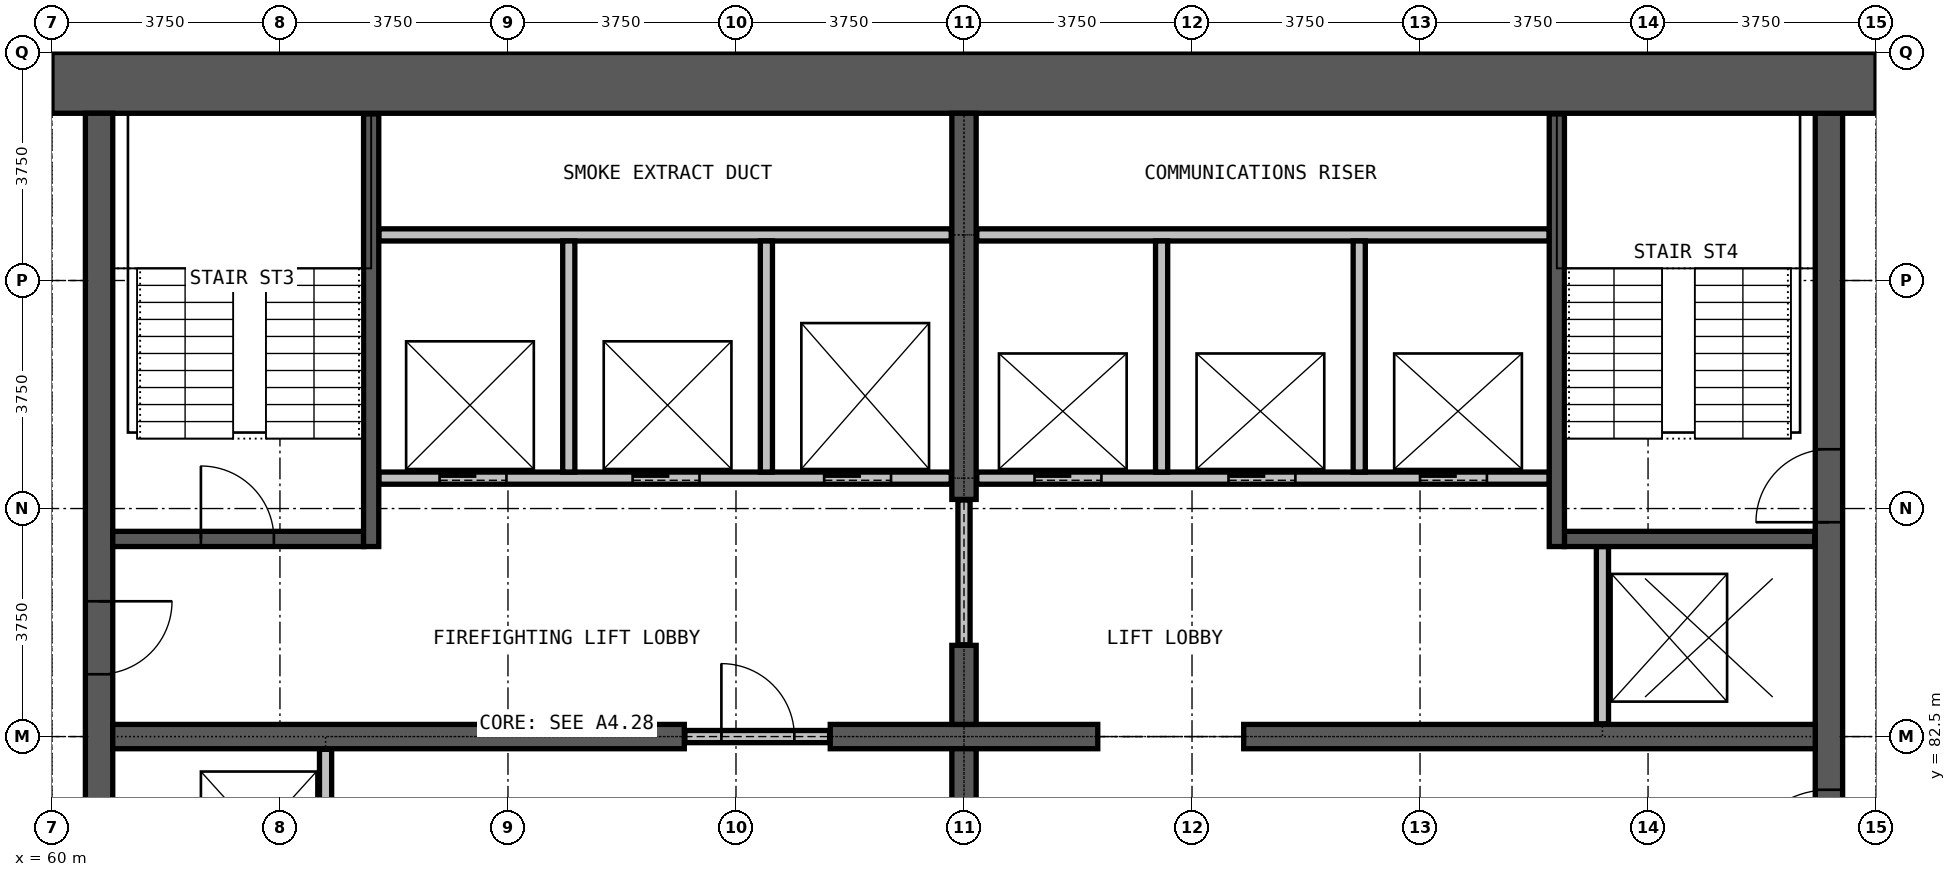
"""IFC4 building model, lengths in metres.
Left out: names, types, materials, properties, quantities, classifications, styles, units other than length and angle.
Written with IfcOpenShell. Run it as: python <this file> out.ifc"""

import sys

from ifc_helpers import new_model, si_unit, direction, frame, frame_2d, origin, place, context, subcontext, project, spatial, rectangle, extrude, element, fill, save


model = new_model("IFC4")
c1 = context("Model", 3, precision=1e-05, world=origin(), true_north=direction((0.0, 1.0)))
c2 = subcontext(c1, "Body", "Model", "MODEL_VIEW")
j1 = project(units=[si_unit("LENGTHUNIT", "METRE"), si_unit("PLANEANGLEUNIT", "RADIAN")], contexts=[c1])
p1 = place(None, origin())
s1 = spatial("IfcSite", under=j1, at=p1, CompositionType="ELEMENT")
p2 = place(p1, origin())
s2 = spatial("IfcBuilding", under=s1, at=p2, CompositionType="ELEMENT")
p3 = place(p2, frame((0.0, 0.0, 269.3)))
s3 = spatial("IfcBuildingStorey", under=s2, at=p3, CompositionType="ELEMENT", Elevation=269.3)
p4 = place(p3, frame((89.225, 72.25, 0.0), z_axis=(0.0, 0.0, 1.0), x_axis=(0.0, 1.0, 0.0)))
e1 = element("IfcWall", 1, at=p4, inside=s3, PredefinedType="SHEAR", context=c2, shape_type="SweptSolid", body=[
    extrude(rectangle(XDim=20.5, YDim=0.45, at=frame_2d((10.25, 0.0))), origin(), (0.0, 0.0, 1.0), 3.6),
])
p5 = place(p4, frame((0.275, 0.0, 0.0)))
e2 = element("IfcOpeningElement", 2, at=p5, cuts=e1, PredefinedType="OPENING", context=c2, shape_type="SweptSolid", body=[
    extrude(rectangle(XDim=1.2, YDim=2.2, at=frame_2d((0.6, 1.1))), frame((0.0, 0.235, 0.0), z_axis=(0.0, -1.0, 0.0), x_axis=(1.0, 0.0, 0.0)), (0.0, 0.0, 1.0), 0.47),
])
p6 = place(p4, frame((13.775, 0.0, 0.0)))
e3 = element("IfcOpeningElement", 3, at=p6, cuts=e1, PredefinedType="OPENING", context=c2, shape_type="SweptSolid", body=[
    extrude(rectangle(XDim=1.2, YDim=2.2, at=frame_2d((0.6, 1.1))), frame((0.0, 0.235, 0.0), z_axis=(0.0, -1.0, 0.0), x_axis=(1.0, 0.0, 0.0)), (0.0, 0.0, 1.0), 0.47),
])
p7 = place(p4, frame((7.875, 0.0, 0.0)))
e4 = element("IfcOpeningElement", 4, at=p7, cuts=e1, PredefinedType="OPENING", context=c2, shape_type="SweptSolid", body=[
    extrude(rectangle(XDim=1.5, YDim=2.2, at=frame_2d((0.75, 1.1))), frame((0.0, 0.235, 0.0), z_axis=(0.0, -1.0, 0.0), x_axis=(1.0, 0.0, 0.0)), (0.0, 0.0, 1.0), 0.47),
])
p8 = place(p3, frame((90.0, 93.25, 0.0), z_axis=(0.0, 0.0, 1.0), x_axis=(-1.0, 0.0, 0.0)))
e5 = element("IfcWall", 5, at=p8, inside=s3, PredefinedType="SHEAR", context=c2, shape_type="SweptSolid", body=[
    extrude(rectangle(XDim=30.0, YDim=1.0, at=frame_2d((15.0, 0.0))), origin(), (0.0, 0.0, 1.0), 3.6),
])
p9 = place(p3, frame((60.775, 92.75, 0.0), z_axis=(0.0, 0.0, 1.0), x_axis=(0.0, -1.0, 0.0)))
e6 = element("IfcWall", 6, at=p9, inside=s3, PredefinedType="SHEAR", context=c2, shape_type="SweptSolid", body=[
    extrude(rectangle(XDim=20.5, YDim=0.45, at=frame_2d((10.25, 0.0))), origin(), (0.0, 0.0, 1.0), 3.6),
])
p10 = place(p9, frame((19.025, 0.0, 0.0)))
e7 = element("IfcOpeningElement", 7, at=p10, cuts=e6, PredefinedType="OPENING", context=c2, shape_type="SweptSolid", body=[
    extrude(rectangle(XDim=1.2, YDim=2.2, at=frame_2d((0.6, 1.1))), frame((0.0, 0.235, 0.0), z_axis=(0.0, -1.0, 0.0), x_axis=(1.0, 0.0, 0.0)), (0.0, 0.0, 1.0), 0.47),
])
p11 = place(p9, frame((8.025, 0.0, 0.0)))
e8 = element("IfcOpeningElement", 8, at=p11, cuts=e6, PredefinedType="OPENING", context=c2, shape_type="SweptSolid", body=[
    extrude(rectangle(XDim=1.2, YDim=2.2, at=frame_2d((0.6, 1.1))), frame((0.0, 0.235, 0.0), z_axis=(0.0, -1.0, 0.0), x_axis=(1.0, 0.0, 0.0)), (0.0, 0.0, 1.0), 0.47),
])
p12 = place(p3, frame((61.0, 82.5, 0.0), z_axis=(0.0, 0.0, 1.0), x_axis=(1.0, 0.0, 0.0)))
e9 = element("IfcWall", 9, at=p12, inside=s3, PredefinedType="SHEAR", context=c2, shape_type="SweptSolid", body=[
    extrude(rectangle(XDim=9.4, YDim=0.4, at=frame_2d((4.7, 0.0))), origin(), (0.0, 0.0, 1.0), 3.6),
])
p13 = place(p3, frame((72.8, 82.5, 0.0), z_axis=(0.0, 0.0, 1.0), x_axis=(1.0, 0.0, 0.0)))
e10 = element("IfcWall", 10, at=p13, inside=s3, PredefinedType="SHEAR", context=c2, shape_type="SweptSolid", body=[
    extrude(rectangle(XDim=4.4, YDim=0.4, at=frame_2d((2.2, 0.0))), origin(), (0.0, 0.0, 1.0), 3.6),
])
p14 = place(p3, frame((79.6, 82.5, 0.0), z_axis=(0.0, 0.0, 1.0), x_axis=(1.0, 0.0, 0.0)))
e11 = element("IfcWall", 11, at=p14, inside=s3, PredefinedType="SHEAR", context=c2, shape_type="SweptSolid", body=[
    extrude(rectangle(XDim=9.4, YDim=0.4, at=frame_2d((4.7, 0.0))), origin(), (0.0, 0.0, 1.0), 3.6),
])
for number, where, z_axis, x_axis in (
    (12, (75.0, 81.0, 0.0), (0.0, 0.0, 1.0), (0.0, 1.0, 0.0)),
    (13, (75.0, 82.7, 0.0), (0.0, 0.0, 1.0), (0.0, 1.0, 0.0)),
):
    element("IfcWall", number, at=place(p3, frame(where, z_axis=z_axis, x_axis=x_axis)), inside=s3, PredefinedType="SHEAR", context=c2, shape_type="SweptSolid", body=[
        extrude(rectangle(XDim=1.3, YDim=0.4, at=frame_2d((0.65, 0.0))), origin(), (0.0, 0.0, 1.0), 3.6),
    ])
p15 = place(p3, frame((75.0, 86.4, 0.0), z_axis=(0.0, 0.0, 1.0), x_axis=(0.0, 1.0, 0.0)))
e14 = element("IfcWall", 14, at=p15, inside=s3, PredefinedType="SHEAR", context=c2, shape_type="SweptSolid", body=[
    extrude(rectangle(XDim=6.35, YDim=0.4, at=frame_2d((3.175, 0.0))), origin(), (0.0, 0.0, 1.0), 3.6),
])
p16 = place(p3, frame((70.41, 82.5, 0.0), z_axis=(0.0, 0.0, 1.0), x_axis=(1.0, 0.0, 0.0)))
e15 = element("IfcWall", 15, at=p16, inside=s3, PredefinedType="PARTITIONING", context=c2, shape_type="SweptSolid", body=[
    extrude(rectangle(XDim=2.38, YDim=0.2, at=frame_2d((1.19, 0.0))), origin(), (0.0, 0.0, 1.0), 2.4),
])
p17 = place(p16, frame((0.6, 0.0, 0.0)))
e16 = element("IfcOpeningElement", 16, at=p17, cuts=e15, PredefinedType="OPENING", context=c2, shape_type="SweptSolid", body=[
    extrude(rectangle(XDim=1.2, YDim=2.2, at=frame_2d((0.6, 1.1))), frame((0.0, 0.11, 0.0), z_axis=(0.0, -1.0, 0.0), x_axis=(1.0, 0.0, 0.0)), (0.0, 0.0, 1.0), 0.22),
])
p18 = place(p3, frame((75.0, 84.01, 0.0), z_axis=(0.0, 0.0, 1.0), x_axis=(0.0, 1.0, 0.0)))
e17 = element("IfcWall", 17, at=p18, inside=s3, PredefinedType="PARTITIONING", context=c2, shape_type="SweptSolid", body=[
    extrude(rectangle(XDim=2.38, YDim=0.2, at=frame_2d((1.19, 0.0))), origin(), (0.0, 0.0, 1.0), 2.4),
])
p19 = place(p3, frame((65.375, 86.75, 0.0), z_axis=(0.0, 0.0, 1.0), x_axis=(1.0, 0.0, 0.0)))
e18 = element("IfcWall", 18, at=p19, inside=s3, PredefinedType="PARTITIONING", context=c2, shape_type="SweptSolid", body=[
    extrude(rectangle(XDim=9.415, YDim=0.2, at=frame_2d((4.708, 0.0))), origin(), (0.0, 0.0, 1.0), 3.3),
])
p20 = place(p19, frame((1.0, 0.0, 0.0)))
e19 = element("IfcOpeningElement", 19, at=p20, cuts=e18, PredefinedType="OPENING", context=c2, shape_type="SweptSolid", body=[
    extrude(rectangle(XDim=1.1, YDim=2.2, at=frame_2d((0.55, 1.1))), frame((0.0, 0.11, 0.0), z_axis=(0.0, -1.0, 0.0), x_axis=(1.0, 0.0, 0.0)), (0.0, 0.0, 1.0), 0.22),
])
p21 = place(p19, frame((4.175, 0.0, 0.0)))
e20 = element("IfcOpeningElement", 20, at=p21, cuts=e18, PredefinedType="OPENING", context=c2, shape_type="SweptSolid", body=[
    extrude(rectangle(XDim=1.1, YDim=2.2, at=frame_2d((0.55, 1.1))), frame((0.0, 0.11, 0.0), z_axis=(0.0, -1.0, 0.0), x_axis=(1.0, 0.0, 0.0)), (0.0, 0.0, 1.0), 0.22),
])
p22 = place(p19, frame((7.325, 0.0, 0.0)))
e21 = element("IfcOpeningElement", 21, at=p22, cuts=e18, PredefinedType="OPENING", context=c2, shape_type="SweptSolid", body=[
    extrude(rectangle(XDim=1.1, YDim=2.2, at=frame_2d((0.55, 1.1))), frame((0.0, 0.11, 0.0), z_axis=(0.0, -1.0, 0.0), x_axis=(1.0, 0.0, 0.0)), (0.0, 0.0, 1.0), 0.22),
])
p23 = place(p3, frame((75.21, 86.75, 0.0), z_axis=(0.0, 0.0, 1.0), x_axis=(1.0, 0.0, 0.0)))
e22 = element("IfcWall", 22, at=p23, inside=s3, PredefinedType="PARTITIONING", context=c2, shape_type="SweptSolid", body=[
    extrude(rectangle(XDim=9.415, YDim=0.2, at=frame_2d((4.708, 0.0))), origin(), (0.0, 0.0, 1.0), 3.3),
])
p24 = place(p23, frame((0.95, 0.0, 0.0)))
e23 = element("IfcOpeningElement", 23, at=p24, cuts=e22, PredefinedType="OPENING", context=c2, shape_type="SweptSolid", body=[
    extrude(rectangle(XDim=1.1, YDim=2.2, at=frame_2d((0.55, 1.1))), frame((0.0, 0.11, 0.0), z_axis=(0.0, -1.0, 0.0), x_axis=(1.0, 0.0, 0.0)), (0.0, 0.0, 1.0), 0.22),
])
p25 = place(p23, frame((4.14, 0.0, 0.0)))
e24 = element("IfcOpeningElement", 24, at=p25, cuts=e22, PredefinedType="OPENING", context=c2, shape_type="SweptSolid", body=[
    extrude(rectangle(XDim=1.1, YDim=2.2, at=frame_2d((0.55, 1.1))), frame((0.0, 0.11, 0.0), z_axis=(0.0, -1.0, 0.0), x_axis=(1.0, 0.0, 0.0)), (0.0, 0.0, 1.0), 0.22),
])
p26 = place(p23, frame((7.29, 0.0, 0.0)))
e25 = element("IfcOpeningElement", 25, at=p26, cuts=e22, PredefinedType="OPENING", context=c2, shape_type="SweptSolid", body=[
    extrude(rectangle(XDim=1.1, YDim=2.2, at=frame_2d((0.55, 1.1))), frame((0.0, 0.11, 0.0), z_axis=(0.0, -1.0, 0.0), x_axis=(1.0, 0.0, 0.0)), (0.0, 0.0, 1.0), 0.22),
])
for number, where, z_axis, x_axis in (
    (26, (65.375, 90.75, 0.0), (0.0, 0.0, 1.0), (1.0, 0.0, 0.0)),
    (27, (75.21, 90.75, 0.0), (0.0, 0.0, 1.0), (1.0, 0.0, 0.0)),
):
    element("IfcWall", number, at=place(p3, frame(where, z_axis=z_axis, x_axis=x_axis)), inside=s3, PredefinedType="PARTITIONING", context=c2, shape_type="SweptSolid", body=[
        extrude(rectangle(XDim=9.415, YDim=0.2, at=frame_2d((4.708, 0.0))), origin(), (0.0, 0.0, 1.0), 3.3),
    ])
p27 = place(p3, frame((64.5, 79.375, 0.0), z_axis=(0.0, 0.0, 1.0), x_axis=(0.0, 1.0, 0.0)))
e28 = element("IfcWall", 28, at=p27, inside=s3, PredefinedType="PARTITIONING", context=c2, shape_type="SweptSolid", body=[
    extrude(rectangle(XDim=2.915, YDim=0.2, at=frame_2d((1.458, 0.0))), origin(), (0.0, 0.0, 1.0), 3.3),
])
for number, where, z_axis, x_axis in (
    (29, (68.5, 86.85, 0.0), (0.0, 0.0, 1.0), (0.0, 1.0, 0.0)),
    (30, (71.75, 86.85, 0.0), (0.0, 0.0, 1.0), (0.0, 1.0, 0.0)),
    (31, (78.25, 86.85, 0.0), (0.0, 0.0, 1.0), (0.0, 1.0, 0.0)),
    (32, (81.5, 86.85, 0.0), (0.0, 0.0, 1.0), (0.0, 1.0, 0.0)),
):
    element("IfcWall", number, at=place(p3, frame(where, z_axis=z_axis, x_axis=x_axis)), inside=s3, PredefinedType="PARTITIONING", context=c2, shape_type="SweptSolid", body=[
        extrude(rectangle(XDim=3.8, YDim=0.2, at=frame_2d((1.9, 0.0))), origin(), (0.0, 0.0, 1.0), 3.3),
    ])
p28 = place(p3, frame((85.5, 82.71, 0.0), z_axis=(0.0, 0.0, 1.0), x_axis=(0.0, 1.0, 0.0)))
e33 = element("IfcWall", 33, at=p28, inside=s3, PredefinedType="PARTITIONING", context=c2, shape_type="SweptSolid", body=[
    extrude(rectangle(XDim=2.915, YDim=0.2, at=frame_2d((1.458, 0.0))), origin(), (0.0, 0.0, 1.0), 3.3),
])
p29 = place(p3, frame((61.0, 85.75, 0.0), z_axis=(0.0, 0.0, 1.0), x_axis=(1.0, 0.0, 0.0)))
e34 = element("IfcWall", 34, at=p29, inside=s3, PredefinedType="PARTITIONING", context=c2, shape_type="SweptSolid", body=[
    extrude(rectangle(XDim=4.125, YDim=0.25, at=frame_2d((2.062, 0.0))), origin(), (0.0, 0.0, 1.0), 3.3),
])
p30 = place(p29, frame((1.45, 0.0, 0.0)))
e35 = element("IfcOpeningElement", 35, at=p30, cuts=e34, PredefinedType="OPENING", context=c2, shape_type="SweptSolid", body=[
    extrude(rectangle(XDim=1.2, YDim=2.2, at=frame_2d((0.6, 1.1))), frame((0.0, 0.135, 0.0), z_axis=(0.0, -1.0, 0.0), x_axis=(1.0, 0.0, 0.0)), (0.0, 0.0, 1.0), 0.27),
])
p31 = place(p3, frame((84.875, 85.75, 0.0), z_axis=(0.0, 0.0, 1.0), x_axis=(1.0, 0.0, 0.0)))
e36 = element("IfcWall", 36, at=p31, inside=s3, PredefinedType="PARTITIONING", context=c2, shape_type="SweptSolid", body=[
    extrude(rectangle(XDim=4.115, YDim=0.25, at=frame_2d((2.058, 0.0))), origin(), (0.0, 0.0, 1.0), 3.3),
])
for number, where, z_axis, x_axis in (
    (37, (65.25, 85.625, 0.0), (0.0, 0.0, 1.0), (0.0, 1.0, 0.0)),
    (38, (84.75, 85.625, 0.0), (0.0, 0.0, 1.0), (0.0, 1.0, 0.0)),
):
    element("IfcWall", number, at=place(p3, frame(where, z_axis=z_axis, x_axis=x_axis)), inside=s3, PredefinedType="PARTITIONING", context=c2, shape_type="SweptSolid", body=[
        extrude(rectangle(XDim=7.115, YDim=0.25, at=frame_2d((3.558, 0.0))), origin(), (0.0, 0.0, 1.0), 3.3),
    ])
p32 = place(p24, origin())
e39 = element("IfcDoor", 39, at=p32, inside=s3, OperationType="DOUBLE_DOOR_SLIDING", PredefinedType="DOOR", context=c2, shape_type="SweptSolid", body=[
    extrude(rectangle(XDim=1.1, YDim=2.2, at=frame_2d((0.55, 1.1))), frame((0.0, 0.025, 0.0), z_axis=(0.0, -1.0, 0.0), x_axis=(1.0, 0.0, 0.0)), (0.0, 0.0, 1.0), 0.05),
])
fill(e23, e39)
p33 = place(p25, origin())
e40 = element("IfcDoor", 40, at=p33, inside=s3, OperationType="DOUBLE_DOOR_SLIDING", PredefinedType="DOOR", context=c2, shape_type="SweptSolid", body=[
    extrude(rectangle(XDim=1.1, YDim=2.2, at=frame_2d((0.55, 1.1))), frame((0.0, 0.025, 0.0), z_axis=(0.0, -1.0, 0.0), x_axis=(1.0, 0.0, 0.0)), (0.0, 0.0, 1.0), 0.05),
])
fill(e24, e40)
p34 = place(p26, origin())
e41 = element("IfcDoor", 41, at=p34, inside=s3, OperationType="DOUBLE_DOOR_SLIDING", PredefinedType="DOOR", context=c2, shape_type="SweptSolid", body=[
    extrude(rectangle(XDim=1.1, YDim=2.2, at=frame_2d((0.55, 1.1))), frame((0.0, 0.025, 0.0), z_axis=(0.0, -1.0, 0.0), x_axis=(1.0, 0.0, 0.0)), (0.0, 0.0, 1.0), 0.05),
])
fill(e25, e41)
p35 = place(p20, origin())
e42 = element("IfcDoor", 42, at=p35, inside=s3, OperationType="DOUBLE_DOOR_SLIDING", PredefinedType="DOOR", context=c2, shape_type="SweptSolid", body=[
    extrude(rectangle(XDim=1.1, YDim=2.2, at=frame_2d((0.55, 1.1))), frame((0.0, 0.025, 0.0), z_axis=(0.0, -1.0, 0.0), x_axis=(1.0, 0.0, 0.0)), (0.0, 0.0, 1.0), 0.05),
])
fill(e19, e42)
p36 = place(p21, origin())
e43 = element("IfcDoor", 43, at=p36, inside=s3, OperationType="DOUBLE_DOOR_SLIDING", PredefinedType="DOOR", context=c2, shape_type="SweptSolid", body=[
    extrude(rectangle(XDim=1.1, YDim=2.2, at=frame_2d((0.55, 1.1))), frame((0.0, 0.025, 0.0), z_axis=(0.0, -1.0, 0.0), x_axis=(1.0, 0.0, 0.0)), (0.0, 0.0, 1.0), 0.05),
])
fill(e20, e43)
p37 = place(p22, origin())
e44 = element("IfcDoor", 44, at=p37, inside=s3, OperationType="DOUBLE_DOOR_SLIDING", PredefinedType="DOOR", context=c2, shape_type="SweptSolid", body=[
    extrude(rectangle(XDim=1.1, YDim=2.2, at=frame_2d((0.55, 1.1))), frame((0.0, 0.025, 0.0), z_axis=(0.0, -1.0, 0.0), x_axis=(1.0, 0.0, 0.0)), (0.0, 0.0, 1.0), 0.05),
])
fill(e21, e44)
p38 = place(p17, origin())
e45 = element("IfcDoor", 45, at=p38, inside=s3, OperationType="SINGLE_SWING_RIGHT", PredefinedType="DOOR", context=c2, shape_type="SweptSolid", body=[
    extrude(rectangle(XDim=1.2, YDim=2.2, at=frame_2d((0.6, 1.1))), frame((0.0, 0.025, 0.0), z_axis=(0.0, -1.0, 0.0), x_axis=(1.0, 0.0, 0.0)), (0.0, 0.0, 1.0), 0.05),
])
fill(e16, e45)
p39 = place(p30, origin())
e46 = element("IfcDoor", 46, at=p39, inside=s3, OperationType="SINGLE_SWING_LEFT", PredefinedType="DOOR", context=c2, shape_type="SweptSolid", body=[
    extrude(rectangle(XDim=1.2, YDim=2.2, at=frame_2d((0.6, 1.1))), frame((0.0, 0.025, 0.0), z_axis=(0.0, -1.0, 0.0), x_axis=(1.0, 0.0, 0.0)), (0.0, 0.0, 1.0), 0.05),
])
fill(e35, e46)
p40 = place(p6, origin())
e47 = element("IfcDoor", 47, at=p40, inside=s3, OperationType="SINGLE_SWING_LEFT", PredefinedType="DOOR", context=c2, shape_type="SweptSolid", body=[
    extrude(rectangle(XDim=1.2, YDim=2.2, at=frame_2d((0.6, 1.1))), frame((0.0, 0.025, 0.0), z_axis=(0.0, -1.0, 0.0), x_axis=(1.0, 0.0, 0.0)), (0.0, 0.0, 1.0), 0.05),
])
fill(e3, e47)
p41 = place(p7, origin())
e48 = element("IfcDoor", 48, at=p41, inside=s3, OperationType="DOUBLE_DOOR_SINGLE_SWING", PredefinedType="DOOR", context=c2, shape_type="SweptSolid", body=[
    extrude(rectangle(XDim=1.5, YDim=2.2, at=frame_2d((0.75, 1.1))), frame((0.0, 0.025, 0.0), z_axis=(0.0, -1.0, 0.0), x_axis=(1.0, 0.0, 0.0)), (0.0, 0.0, 1.0), 0.05),
])
fill(e4, e48)
p42 = place(p11, origin())
e49 = element("IfcDoor", 49, at=p42, inside=s3, OperationType="SINGLE_SWING_LEFT", PredefinedType="DOOR", context=c2, shape_type="SweptSolid", body=[
    extrude(rectangle(XDim=1.2, YDim=2.2, at=frame_2d((0.6, 1.1))), frame((0.0, 0.025, 0.0), z_axis=(0.0, -1.0, 0.0), x_axis=(1.0, 0.0, 0.0)), (0.0, 0.0, 1.0), 0.05),
])
fill(e8, e49)
save(model, sys.argv[1])
